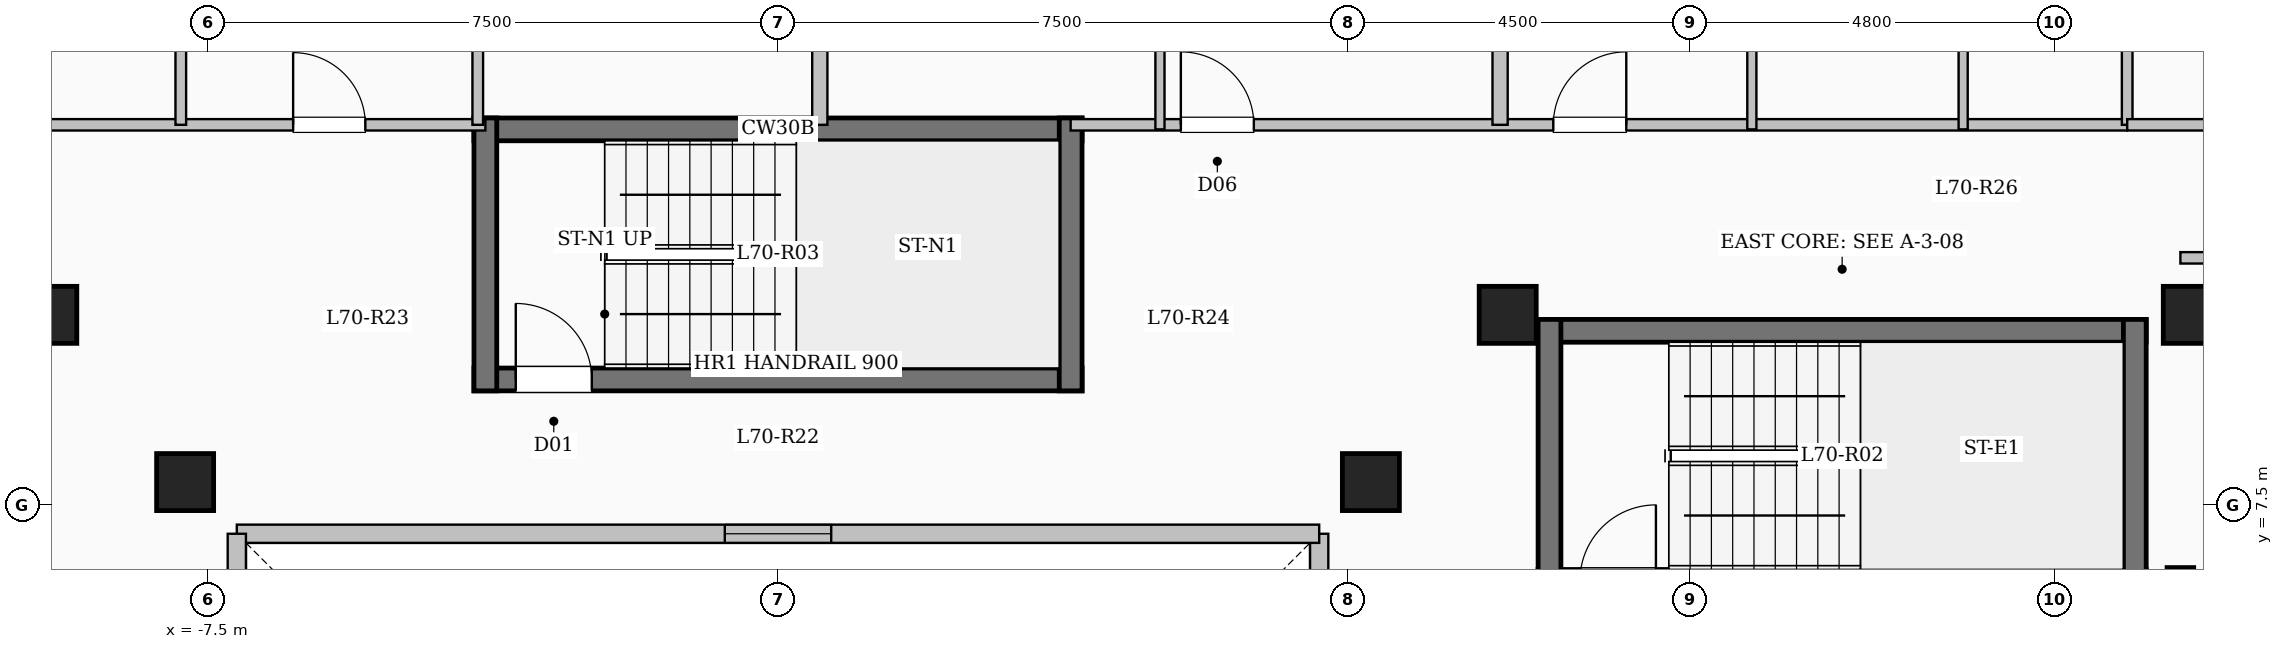
"""IFC4 building model, lengths in metres.
Left out: names, types, materials, properties, quantities, classifications, styles, units other than length and angle.
Written with IfcOpenShell. Run it as: python <this file> out.ifc"""

import sys

from ifc_helpers import new_model, si_unit, direction, frame, frame_2d, origin, origin_2d, place, context, subcontext, project, spatial, rectangle, extrude, element, fill, save


model = new_model("IFC4")
c1 = context("Model", 3, precision=1e-05, world=origin(), true_north=direction((0.0, 1.0)))
c2 = subcontext(c1, "Body", "Model", "MODEL_VIEW")
j1 = project(units=[si_unit("LENGTHUNIT", "METRE"), si_unit("PLANEANGLEUNIT", "RADIAN")], contexts=[c1])
p1 = place(None, origin())
s1 = spatial("IfcSite", under=j1, at=p1, CompositionType="ELEMENT")
p2 = place(p1, origin())
s2 = spatial("IfcBuilding", under=s1, at=p2, CompositionType="ELEMENT")
p3 = place(p2, frame((0.0, 0.0, 258.25)))
s3 = spatial("IfcBuildingStorey", under=s2, at=p3, CompositionType="ELEMENT", Elevation=258.25)
for number, where, z_axis, x_axis in (
    (1, (-7.8, 7.8, 0.0), (0.0, 0.0, 1.0), (1.0, 0.0, 0.0)),
    (2, (7.8, 7.8, 0.0), (0.0, 0.0, 1.0), (1.0, 0.0, 0.0)),
    (3, (-9.6, 10.0, 0.0), (0.0, 0.0, 1.0), (1.0, 0.0, 0.0)),
    (4, (9.6, 10.0, 0.0), (0.0, 0.0, 1.0), (1.0, 0.0, 0.0)),
    (5, (18.6, 10.0, 0.0), (0.0, 0.0, 1.0), (1.0, 0.0, 0.0)),
):
    element("IfcColumn", number, at=place(p3, frame(where, z_axis=z_axis, x_axis=x_axis)), inside=s3, PredefinedType="COLUMN", context=c2, shape_type="SweptSolid", body=[
        extrude(rectangle(XDim=0.75, YDim=0.75, at=origin_2d()), origin(), (0.0, 0.0, 1.0), 3.35),
    ])
p4 = place(p3, frame((7.12, -7.12, 0.0), z_axis=(0.0, 0.0, 1.0), x_axis=(0.0, 1.0, 0.0)))
e6 = element("IfcWall", 6, at=p4, inside=s3, PredefinedType="SOLIDWALL", context=c2, shape_type="SweptSolid", body=[
    extrude(rectangle(XDim=14.24, YDim=0.24, at=frame_2d((7.12, 0.0))), origin(), (0.0, 0.0, 1.0), 3.1),
])
p5 = place(p4, frame((6.42, 0.0, 0.95)))
e7 = element("IfcOpeningElement", 7, at=p5, cuts=e6, PredefinedType="OPENING", context=c2, shape_type="SweptSolid", body=[
    extrude(rectangle(XDim=1.4, YDim=1.5, at=frame_2d((0.7, 0.75))), frame((0.0, 0.13, 0.0), z_axis=(0.0, -1.0, 0.0), x_axis=(1.0, 0.0, 0.0)), (0.0, 0.0, 1.0), 0.26),
])
p6 = place(p3, frame((7.12, 7.12, 0.0), z_axis=(0.0, 0.0, 1.0), x_axis=(-1.0, 0.0, 0.0)))
e8 = element("IfcWall", 8, at=p6, inside=s3, PredefinedType="SOLIDWALL", context=c2, shape_type="SweptSolid", body=[
    extrude(rectangle(XDim=14.24, YDim=0.24, at=frame_2d((7.12, 0.0))), origin(), (0.0, 0.0, 1.0), 3.1),
])
p7 = place(p6, frame((6.42, 0.0, 0.95)))
e9 = element("IfcOpeningElement", 9, at=p7, cuts=e8, PredefinedType="OPENING", context=c2, shape_type="SweptSolid", body=[
    extrude(rectangle(XDim=1.4, YDim=1.5, at=frame_2d((0.7, 0.75))), frame((0.0, 0.13, 0.0), z_axis=(0.0, -1.0, 0.0), x_axis=(1.0, 0.0, 0.0)), (0.0, 0.0, 1.0), 0.26),
])
p8 = place(p3, frame((-7.12, 7.12, 0.0), z_axis=(0.0, 0.0, 1.0), x_axis=(0.0, -1.0, 0.0)))
e10 = element("IfcWall", 10, at=p8, inside=s3, PredefinedType="SOLIDWALL", context=c2, shape_type="SweptSolid", body=[
    extrude(rectangle(XDim=14.24, YDim=0.24, at=frame_2d((7.12, 0.0))), origin(), (0.0, 0.0, 1.0), 3.1),
])
p9 = place(p8, frame((6.42, 0.0, 0.95)))
e11 = element("IfcOpeningElement", 11, at=p9, cuts=e10, PredefinedType="OPENING", context=c2, shape_type="SweptSolid", body=[
    extrude(rectangle(XDim=1.4, YDim=1.5, at=frame_2d((0.7, 0.75))), frame((0.0, 0.13, 0.0), z_axis=(0.0, -1.0, 0.0), x_axis=(1.0, 0.0, 0.0)), (0.0, 0.0, 1.0), 0.26),
])
p10 = place(p3, frame((10.0, 9.79, 0.0), z_axis=(0.0, 0.0, 1.0), x_axis=(1.0, 0.0, 0.0)))
e12 = element("IfcWall", 12, at=p10, inside=s3, PredefinedType="SHEAR", context=c2, shape_type="SweptSolid", body=[
    extrude(rectangle(XDim=8.0, YDim=0.3, at=frame_2d((4.0, 0.0))), origin(), (0.0, 0.0, 1.0), 3.35),
])
p11 = place(p3, frame((10.0, 6.5, 0.0), z_axis=(0.0, 0.0, 1.0), x_axis=(1.0, 0.0, 0.0)))
e13 = element("IfcWall", 13, at=p11, inside=s3, PredefinedType="SHEAR", context=c2, shape_type="SweptSolid", body=[
    extrude(rectangle(XDim=8.0, YDim=0.3, at=frame_2d((4.0, 0.0))), origin(), (0.0, 0.0, 1.0), 3.35),
])
p12 = place(p11, frame((0.55, 0.0, 0.0)))
e14 = element("IfcOpeningElement", 14, at=p12, cuts=e13, PredefinedType="OPENING", context=c2, shape_type="SweptSolid", body=[
    extrude(rectangle(XDim=1.0, YDim=2.15, at=frame_2d((0.5, 1.075))), frame((0.0, 0.16, 0.0), z_axis=(0.0, -1.0, 0.0), x_axis=(1.0, 0.0, 0.0)), (0.0, 0.0, 1.0), 0.32),
])
for number, where, z_axis, x_axis in (
    (15, (10.15, 6.35, 0.0), (0.0, 0.0, 1.0), (0.0, 1.0, 0.0)),
    (16, (17.85, 6.35, 0.0), (0.0, 0.0, 1.0), (0.0, 1.0, 0.0)),
):
    element("IfcWall", number, at=place(p3, frame(where, z_axis=z_axis, x_axis=x_axis)), inside=s3, PredefinedType="SHEAR", context=c2, shape_type="SweptSolid", body=[
        extrude(rectangle(XDim=3.59, YDim=0.3, at=frame_2d((1.795, 0.0))), origin(), (0.0, 0.0, 1.0), 3.35),
    ])
p13 = place(p3, frame((-4.0, 12.44, 0.0), z_axis=(0.0, 0.0, 1.0), x_axis=(1.0, 0.0, 0.0)))
e17 = element("IfcWall", 17, at=p13, inside=s3, PredefinedType="SHEAR", context=c2, shape_type="SweptSolid", body=[
    extrude(rectangle(XDim=8.0, YDim=0.3, at=frame_2d((4.0, 0.0))), origin(), (0.0, 0.0, 1.0), 3.35),
])
p14 = place(p3, frame((-4.0, 9.15, 0.0), z_axis=(0.0, 0.0, 1.0), x_axis=(1.0, 0.0, 0.0)))
e18 = element("IfcWall", 18, at=p14, inside=s3, PredefinedType="SHEAR", context=c2, shape_type="SweptSolid", body=[
    extrude(rectangle(XDim=8.0, YDim=0.3, at=frame_2d((4.0, 0.0))), origin(), (0.0, 0.0, 1.0), 3.35),
])
p15 = place(p14, frame((0.55, 0.0, 0.0)))
e19 = element("IfcOpeningElement", 19, at=p15, cuts=e18, PredefinedType="OPENING", context=c2, shape_type="SweptSolid", body=[
    extrude(rectangle(XDim=1.0, YDim=2.15, at=frame_2d((0.5, 1.075))), frame((0.0, 0.16, 0.0), z_axis=(0.0, -1.0, 0.0), x_axis=(1.0, 0.0, 0.0)), (0.0, 0.0, 1.0), 0.32),
])
for number, where, z_axis, x_axis in (
    (20, (-3.85, 9.0, 0.0), (0.0, 0.0, 1.0), (0.0, 1.0, 0.0)),
    (21, (3.85, 9.0, 0.0), (0.0, 0.0, 1.0), (0.0, 1.0, 0.0)),
):
    element("IfcWall", number, at=place(p3, frame(where, z_axis=z_axis, x_axis=x_axis)), inside=s3, PredefinedType="SHEAR", context=c2, shape_type="SweptSolid", body=[
        extrude(rectangle(XDim=3.59, YDim=0.3, at=frame_2d((1.795, 0.0))), origin(), (0.0, 0.0, 1.0), 3.35),
    ])
p16 = place(p3, frame((18.45, -7.375, 0.0), z_axis=(0.0, 0.0, 1.0), x_axis=(0.0, 1.0, 0.0)))
e22 = element("IfcWall", 22, at=p16, inside=s3, PredefinedType="SHEAR", context=c2, shape_type="SweptSolid", body=[
    extrude(rectangle(XDim=14.05, YDim=0.35, at=frame_2d((7.025, 0.0))), origin(), (0.0, 0.0, 1.0), 3.35),
])
p17 = place(p3, frame((-17.75, 12.5, 0.0), z_axis=(0.0, 0.0, 1.0), x_axis=(1.0, 0.0, 0.0)))
e23 = element("IfcWall", 23, at=p17, inside=s3, PredefinedType="PARTITIONING", context=c2, shape_type="SweptSolid", body=[
    extrude(rectangle(XDim=13.9, YDim=0.15, at=frame_2d((6.95, 0.0))), origin(), (0.0, 0.0, 1.0), 3.1),
])
p18 = place(p17, frame((1.968, 0.0, 0.0)))
e24 = element("IfcOpeningElement", 24, at=p18, cuts=e23, PredefinedType="OPENING", context=c2, shape_type="SweptSolid", body=[
    extrude(rectangle(XDim=0.95, YDim=2.15, at=frame_2d((0.475, 1.075))), frame((0.0, 0.085, 0.0), z_axis=(0.0, -1.0, 0.0), x_axis=(1.0, 0.0, 0.0)), (0.0, 0.0, 1.0), 0.17),
])
p19 = place(p17, frame((6.944, 0.0, 0.0)))
e25 = element("IfcOpeningElement", 25, at=p19, cuts=e23, PredefinedType="OPENING", context=c2, shape_type="SweptSolid", body=[
    extrude(rectangle(XDim=0.95, YDim=2.15, at=frame_2d((0.475, 1.075))), frame((0.0, 0.085, 0.0), z_axis=(0.0, -1.0, 0.0), x_axis=(1.0, 0.0, 0.0)), (0.0, 0.0, 1.0), 0.17),
])
p20 = place(p17, frame((11.371, 0.0, 0.0)))
e26 = element("IfcOpeningElement", 26, at=p20, cuts=e23, PredefinedType="OPENING", context=c2, shape_type="SweptSolid", body=[
    extrude(rectangle(XDim=0.95, YDim=2.15, at=frame_2d((0.475, 1.075))), frame((0.0, 0.085, 0.0), z_axis=(0.0, -1.0, 0.0), x_axis=(1.0, 0.0, 0.0)), (0.0, 0.0, 1.0), 0.17),
])
p21 = place(p3, frame((3.85, 12.5, 0.0), z_axis=(0.0, 0.0, 1.0), x_axis=(1.0, 0.0, 0.0)))
e27 = element("IfcWall", 27, at=p21, inside=s3, PredefinedType="PARTITIONING", context=c2, shape_type="SweptSolid", body=[
    extrude(rectangle(XDim=13.9, YDim=0.15, at=frame_2d((6.95, 0.0))), origin(), (0.0, 0.0, 1.0), 3.1),
])
p22 = place(p21, frame((1.45, 0.0, 0.0)))
e28 = element("IfcOpeningElement", 28, at=p22, cuts=e27, PredefinedType="OPENING", context=c2, shape_type="SweptSolid", body=[
    extrude(rectangle(XDim=0.96, YDim=2.15, at=frame_2d((0.48, 1.075))), frame((0.0, 0.085, 0.0), z_axis=(0.0, -1.0, 0.0), x_axis=(1.0, 0.0, 0.0)), (0.0, 0.0, 1.0), 0.17),
])
p23 = place(p21, frame((6.35, 0.0, 0.0)))
e29 = element("IfcOpeningElement", 29, at=p23, cuts=e27, PredefinedType="OPENING", context=c2, shape_type="SweptSolid", body=[
    extrude(rectangle(XDim=0.96, YDim=2.15, at=frame_2d((0.48, 1.075))), frame((0.0, 0.085, 0.0), z_axis=(0.0, -1.0, 0.0), x_axis=(1.0, 0.0, 0.0)), (0.0, 0.0, 1.0), 0.17),
])
p24 = place(p3, frame((0.55, 12.5, 0.0), z_axis=(0.0, 0.0, 1.0), x_axis=(0.0, 1.0, 0.0)))
e30 = element("IfcWall", 30, at=p24, inside=s3, PredefinedType="SOLIDWALL", context=c2, shape_type="SweptSolid", body=[
    extrude(rectangle(XDim=9.88, YDim=0.2, at=frame_2d((4.94, 0.0))), origin(), (0.0, 0.0, 1.0), 3.1),
])
p25 = place(p3, frame((-3.95, 12.5, 0.0), z_axis=(0.0, 0.0, 1.0), x_axis=(0.0, 1.0, 0.0)))
e31 = element("IfcWall", 31, at=p25, inside=s3, PredefinedType="PARTITIONING", context=c2, shape_type="SweptSolid", body=[
    extrude(rectangle(XDim=8.35, YDim=0.14, at=frame_2d((4.175, 0.0))), origin(), (0.0, 0.0, 1.0), 3.1),
])
p26 = place(p25, frame((1.2, 0.0, 0.0)))
e32 = element("IfcOpeningElement", 32, at=p26, cuts=e31, PredefinedType="OPENING", context=c2, shape_type="SweptSolid", body=[
    extrude(rectangle(XDim=0.95, YDim=2.15, at=frame_2d((0.475, 1.075))), frame((0.0, 0.08, 0.0), z_axis=(0.0, -1.0, 0.0), x_axis=(1.0, 0.0, 0.0)), (0.0, 0.0, 1.0), 0.16),
])
p27 = place(p3, frame((-7.857, 12.5, 0.0), z_axis=(0.0, 0.0, 1.0), x_axis=(0.0, 1.0, 0.0)))
e33 = element("IfcWall", 33, at=p27, inside=s3, PredefinedType="PARTITIONING", context=c2, shape_type="SweptSolid", body=[
    extrude(rectangle(XDim=8.35, YDim=0.14, at=frame_2d((4.175, 0.0))), origin(), (0.0, 0.0, 1.0), 2.685),
])
p28 = place(p3, frame((9.5, 12.5, 0.0), z_axis=(0.0, 0.0, 1.0), x_axis=(0.0, 1.0, 0.0)))
e34 = element("IfcWall", 34, at=p28, inside=s3, PredefinedType="SOLIDWALL", context=c2, shape_type="SweptSolid", body=[
    extrude(rectangle(XDim=8.77, YDim=0.2, at=frame_2d((4.385, 0.0))), origin(), (0.0, 0.0, 1.0), 3.1),
])
p29 = place(p3, frame((5.025, 12.44, 0.0), z_axis=(0.0, 0.0, 1.0), x_axis=(0.0, 1.0, 0.0)))
e35 = element("IfcWall", 35, at=p29, inside=s3, PredefinedType="PARTITIONING", context=c2, shape_type="SweptSolid", body=[
    extrude(rectangle(XDim=3.21, YDim=0.12, at=frame_2d((1.605, 0.0))), origin(), (0.0, 0.0, 1.0), 3.1),
])
p30 = place(p29, frame((1.195, 0.0, 0.0)))
e36 = element("IfcOpeningElement", 36, at=p30, cuts=e35, PredefinedType="OPENING", context=c2, shape_type="SweptSolid", body=[
    extrude(rectangle(XDim=0.88, YDim=2.1, at=frame_2d((0.44, 1.05))), frame((0.0, 0.07, 0.0), z_axis=(0.0, -1.0, 0.0), x_axis=(1.0, 0.0, 0.0)), (0.0, 0.0, 1.0), 0.14),
])
p31 = place(p3, frame((12.812, 12.44, 0.0), z_axis=(0.0, 0.0, 1.0), x_axis=(0.0, 1.0, 0.0)))
e37 = element("IfcWall", 37, at=p31, inside=s3, PredefinedType="PARTITIONING", context=c2, shape_type="SweptSolid", body=[
    extrude(rectangle(XDim=8.46, YDim=0.12, at=frame_2d((4.23, 0.0))), origin(), (0.0, 0.0, 1.0), 3.1),
])
p32 = place(p31, frame((3.075, 0.0, 0.0)))
e38 = element("IfcOpeningElement", 38, at=p32, cuts=e37, PredefinedType="OPENING", context=c2, shape_type="SweptSolid", body=[
    extrude(rectangle(XDim=1.08, YDim=2.15, at=frame_2d((0.54, 1.075))), frame((0.0, 0.07, 0.0), z_axis=(0.0, -1.0, 0.0), x_axis=(1.0, 0.0, 0.0)), (0.0, 0.0, 1.0), 0.14),
])
p33 = place(p3, frame((15.592, 12.44, 0.0), z_axis=(0.0, 0.0, 1.0), x_axis=(0.0, 1.0, 0.0)))
e39 = element("IfcWall", 39, at=p33, inside=s3, PredefinedType="PARTITIONING", context=c2, shape_type="SweptSolid", body=[
    extrude(rectangle(XDim=2.79, YDim=0.12, at=frame_2d((1.395, 0.0))), origin(), (0.0, 0.0, 1.0), 3.1),
])
p34 = place(p3, frame((18.45, 10.75, 0.0), z_axis=(0.0, 0.0, 1.0), x_axis=(1.0, 0.0, 0.0)))
e40 = element("IfcWall", 40, at=p34, inside=s3, PredefinedType="PARTITIONING", context=c2, shape_type="SweptSolid", body=[
    extrude(rectangle(XDim=4.23, YDim=0.15, at=frame_2d((2.115, 0.0))), origin(), (0.0, 0.0, 1.0), 3.1),
])
p35 = place(p3, frame((17.75, 12.5, 0.0), z_axis=(0.0, 0.0, 1.0), x_axis=(0.0, 1.0, 0.0)))
e41 = element("IfcWall", 41, at=p35, inside=s3, PredefinedType="PARTITIONING", context=c2, shape_type="SweptSolid", body=[
    extrude(rectangle(XDim=5.05, YDim=0.14, at=frame_2d((2.525, 0.0))), origin(), (0.0, 0.0, 1.0), 3.1),
])
p36 = place(p3, frame((17.75, 12.5, 0.0), z_axis=(0.0, 0.0, 1.0), x_axis=(1.0, 0.0, 0.0)))
e42 = element("IfcWall", 42, at=p36, inside=s3, PredefinedType="PARTITIONING", context=c2, shape_type="SweptSolid", body=[
    extrude(rectangle(XDim=4.93, YDim=0.15, at=frame_2d((2.465, 0.0))), origin(), (0.0, 0.0, 1.0), 3.1),
])
p37 = place(p36, frame((1.99, 0.0, 0.0)))
e43 = element("IfcOpeningElement", 43, at=p37, cuts=e42, PredefinedType="OPENING", context=c2, shape_type="SweptSolid", body=[
    extrude(rectangle(XDim=0.95, YDim=2.15, at=frame_2d((0.475, 1.075))), frame((0.0, 0.085, 0.0), z_axis=(0.0, -1.0, 0.0), x_axis=(1.0, 0.0, 0.0)), (0.0, 0.0, 1.0), 0.17),
])
p38 = place(p7, origin())
e44 = element("IfcWindow", 44, at=p38, inside=s3, PartitioningType="SINGLE_PANEL", PredefinedType="WINDOW", context=c2, shape_type="SweptSolid", body=[
    extrude(rectangle(XDim=1.4, YDim=1.5, at=frame_2d((0.7, 0.75))), frame((0.0, 0.03, 0.0), z_axis=(0.0, -1.0, 0.0), x_axis=(1.0, 0.0, 0.0)), (0.0, 0.0, 1.0), 0.06),
])
fill(e9, e44)
p39 = place(p15, origin())
e45 = element("IfcDoor", 45, at=p39, inside=s3, OperationType="SINGLE_SWING_LEFT", PredefinedType="DOOR", context=c2, shape_type="SweptSolid", body=[
    extrude(rectangle(XDim=1.0, YDim=2.15, at=frame_2d((0.5, 1.075))), frame((0.0, 0.025, 0.0), z_axis=(0.0, -1.0, 0.0), x_axis=(1.0, 0.0, 0.0)), (0.0, 0.0, 1.0), 0.05),
])
fill(e19, e45)
p40 = place(p20, origin())
e46 = element("IfcDoor", 46, at=p40, inside=s3, OperationType="SINGLE_SWING_LEFT", PredefinedType="DOOR", context=c2, shape_type="SweptSolid", body=[
    extrude(rectangle(XDim=0.95, YDim=2.15, at=frame_2d((0.475, 1.075))), frame((0.0, 0.025, 0.0), z_axis=(0.0, -1.0, 0.0), x_axis=(1.0, 0.0, 0.0)), (0.0, 0.0, 1.0), 0.05),
])
fill(e26, e46)
p41 = place(p22, origin())
e47 = element("IfcDoor", 47, at=p41, inside=s3, OperationType="SINGLE_SWING_LEFT", PredefinedType="DOOR", context=c2, shape_type="SweptSolid", body=[
    extrude(rectangle(XDim=0.96, YDim=2.15, at=frame_2d((0.48, 1.075))), frame((0.0, 0.025, 0.0), z_axis=(0.0, -1.0, 0.0), x_axis=(1.0, 0.0, 0.0)), (0.0, 0.0, 1.0), 0.05),
])
fill(e28, e47)
p42 = place(p23, origin())
e48 = element("IfcDoor", 48, at=p42, inside=s3, OperationType="SINGLE_SWING_RIGHT", PredefinedType="DOOR", context=c2, shape_type="SweptSolid", body=[
    extrude(rectangle(XDim=0.96, YDim=2.15, at=frame_2d((0.48, 1.075))), frame((0.0, 0.025, 0.0), z_axis=(0.0, -1.0, 0.0), x_axis=(1.0, 0.0, 0.0)), (0.0, 0.0, 1.0), 0.05),
])
fill(e29, e48)
save(model, sys.argv[1])
